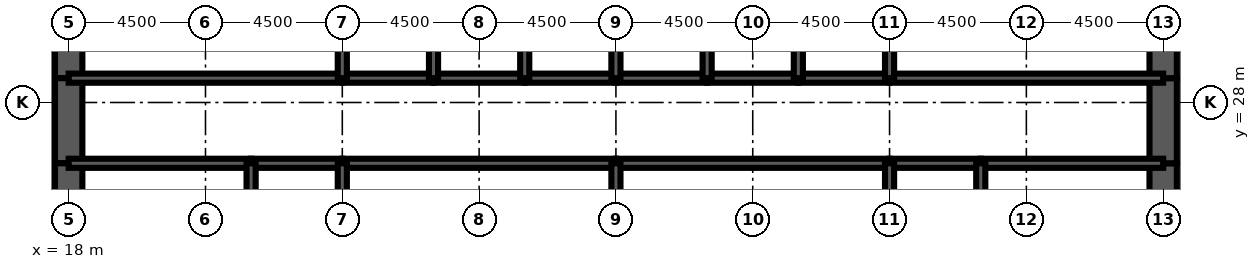
"""IFC4 building model, lengths in metres.
Left out: names, types, materials, properties, quantities, classifications, styles, units other than length and angle.
Written with IfcOpenShell. Run it as: python <this file> out.ifc"""

import sys

from ifc_helpers import new_model, si_unit, direction, frame, frame_2d, origin, place, context, subcontext, project, spatial, rectangle, extrude, element, fill, save


model = new_model("IFC4")
c1 = context("Model", 3, precision=1e-05, world=origin(), true_north=direction((0.0, 1.0)))
c2 = subcontext(c1, "Body", "Model", "MODEL_VIEW")
j1 = project(units=[si_unit("LENGTHUNIT", "METRE"), si_unit("PLANEANGLEUNIT", "RADIAN")], contexts=[c1])
p1 = place(None, origin())
s1 = spatial("IfcSite", under=j1, at=p1, CompositionType="ELEMENT")
p2 = place(p1, origin())
s2 = spatial("IfcBuilding", under=s1, at=p2, CompositionType="ELEMENT")
p3 = place(p2, frame((0.0, 0.0, -6.0)))
s3 = spatial("IfcBuildingStorey", under=s2, at=p3, CompositionType="ELEMENT", Elevation=-6.0)
p4 = place(p3, frame((18.0, 32.0, 0.0), z_axis=(0.0, 0.0, 1.0), x_axis=(0.0, -1.0, 0.0)))
e1 = element("IfcWall", 1, at=p4, inside=s3, PredefinedType="SHEAR", context=c2, shape_type="SweptSolid", body=[
    extrude(rectangle(XDim=3.2, YDim=0.9, at=frame_2d((1.6, 0.0))), origin(), (0.0, 0.0, 1.0), 6.0),
])
p5 = place(p3, frame((18.0, 28.8, 0.0), z_axis=(0.0, 0.0, 1.0), x_axis=(0.0, -1.0, 0.0)))
e2 = element("IfcWall", 2, at=p5, inside=s3, PredefinedType="SHEAR", context=c2, shape_type="SweptSolid", body=[
    extrude(rectangle(XDim=2.8, YDim=0.9, at=frame_2d((1.4, 0.0))), origin(), (0.0, 0.0, 1.0), 6.0),
])
p6 = place(p5, frame((0.4, 0.0, 0.0)))
e3 = element("IfcOpeningElement", 3, at=p6, cuts=e2, PredefinedType="OPENING", context=c2, shape_type="SweptSolid", body=[
    extrude(rectangle(XDim=1.8, YDim=2.1, at=frame_2d((0.9, 1.05))), frame((0.0, 0.46, 0.0), z_axis=(0.0, -1.0, 0.0), x_axis=(1.0, 0.0, 0.0)), (0.0, 0.0, 1.0), 0.92),
])
for number, where, z_axis, x_axis in (
    (4, (18.0, 26.0, 0.0), (0.0, 0.0, 1.0), (0.0, -1.0, 0.0)),
    (5, (54.0, 22.0, 0.0), (0.0, 0.0, 1.0), (0.0, 1.0, 0.0)),
):
    element("IfcWall", number, at=place(p3, frame(where, z_axis=z_axis, x_axis=x_axis)), inside=s3, PredefinedType="SHEAR", context=c2, shape_type="SweptSolid", body=[
        extrude(rectangle(XDim=4.0, YDim=0.9, at=frame_2d((2.0, 0.0))), origin(), (0.0, 0.0, 1.0), 6.0),
    ])
p7 = place(p3, frame((54.0, 26.0, 0.0), z_axis=(0.0, 0.0, 1.0), x_axis=(0.0, 1.0, 0.0)))
e6 = element("IfcWall", 6, at=p7, inside=s3, PredefinedType="SHEAR", context=c2, shape_type="SweptSolid", body=[
    extrude(rectangle(XDim=2.8, YDim=0.9, at=frame_2d((1.4, 0.0))), origin(), (0.0, 0.0, 1.0), 6.0),
])
p8 = place(p7, frame((0.6, 0.0, 0.0)))
e7 = element("IfcOpeningElement", 7, at=p8, cuts=e6, PredefinedType="OPENING", context=c2, shape_type="SweptSolid", body=[
    extrude(rectangle(XDim=1.8, YDim=2.1, at=frame_2d((0.9, 1.05))), frame((0.0, 0.46, 0.0), z_axis=(0.0, -1.0, 0.0), x_axis=(1.0, 0.0, 0.0)), (0.0, 0.0, 1.0), 0.92),
])
p9 = place(p3, frame((54.0, 28.8, 0.0), z_axis=(0.0, 0.0, 1.0), x_axis=(0.0, 1.0, 0.0)))
e8 = element("IfcWall", 8, at=p9, inside=s3, PredefinedType="SHEAR", context=c2, shape_type="SweptSolid", body=[
    extrude(rectangle(XDim=3.2, YDim=0.9, at=frame_2d((1.6, 0.0))), origin(), (0.0, 0.0, 1.0), 6.0),
])
p10 = place(p3, frame((18.0, 28.8, 0.0), z_axis=(0.0, 0.0, 1.0), x_axis=(1.0, 0.0, 0.0)))
e9 = element("IfcWall", 9, at=p10, inside=s3, PredefinedType="SOLIDWALL", context=c2, shape_type="SweptSolid", body=[
    extrude(rectangle(XDim=9.0, YDim=0.3, at=frame_2d((4.5, 0.0))), origin(), (0.0, 0.0, 1.0), 6.0),
])
p11 = place(p10, frame((0.65, 0.0, 0.0)))
e10 = element("IfcOpeningElement", 10, at=p11, cuts=e9, PredefinedType="OPENING", context=c2, shape_type="SweptSolid", body=[
    extrude(rectangle(XDim=1.0, YDim=2.1, at=frame_2d((0.5, 1.05))), frame((0.0, 0.16, 0.0), z_axis=(0.0, -1.0, 0.0), x_axis=(1.0, 0.0, 0.0)), (0.0, 0.0, 1.0), 0.32),
])
p12 = place(p3, frame((27.0, 28.8, 0.0), z_axis=(0.0, 0.0, 1.0), x_axis=(1.0, 0.0, 0.0)))
e11 = element("IfcWall", 11, at=p12, inside=s3, PredefinedType="SOLIDWALL", context=c2, shape_type="SweptSolid", body=[
    extrude(rectangle(XDim=3.0, YDim=0.3, at=frame_2d((1.5, 0.0))), origin(), (0.0, 0.0, 1.0), 6.0),
])
p13 = place(p12, frame((0.95, 0.0, 0.0)))
e12 = element("IfcOpeningElement", 12, at=p13, cuts=e11, PredefinedType="OPENING", context=c2, shape_type="SweptSolid", body=[
    extrude(rectangle(XDim=1.1, YDim=2.2, at=frame_2d((0.55, 1.1))), frame((0.0, 0.16, 0.0), z_axis=(0.0, -1.0, 0.0), x_axis=(1.0, 0.0, 0.0)), (0.0, 0.0, 1.0), 0.32),
])
for number, where, z_axis, x_axis in (
    (13, (30.0, 28.8, 0.0), (0.0, 0.0, 1.0), (1.0, 0.0, 0.0)),
    (14, (33.0, 28.8, 0.0), (0.0, 0.0, 1.0), (1.0, 0.0, 0.0)),
    (15, (36.0, 28.8, 0.0), (0.0, 0.0, 1.0), (1.0, 0.0, 0.0)),
    (16, (39.0, 28.8, 0.0), (0.0, 0.0, 1.0), (1.0, 0.0, 0.0)),
):
    element("IfcWall", number, at=place(p3, frame(where, z_axis=z_axis, x_axis=x_axis)), inside=s3, PredefinedType="SOLIDWALL", context=c2, shape_type="SweptSolid", body=[
        extrude(rectangle(XDim=3.0, YDim=0.3, at=frame_2d((1.5, 0.0))), origin(), (0.0, 0.0, 1.0), 6.0),
    ])
p14 = place(p3, frame((42.0, 28.8, 0.0), z_axis=(0.0, 0.0, 1.0), x_axis=(1.0, 0.0, 0.0)))
e17 = element("IfcWall", 17, at=p14, inside=s3, PredefinedType="SOLIDWALL", context=c2, shape_type="SweptSolid", body=[
    extrude(rectangle(XDim=3.0, YDim=0.3, at=frame_2d((1.5, 0.0))), origin(), (0.0, 0.0, 1.0), 6.0),
])
p15 = place(p14, frame((0.95, 0.0, 0.0)))
e18 = element("IfcOpeningElement", 18, at=p15, cuts=e17, PredefinedType="OPENING", context=c2, shape_type="SweptSolid", body=[
    extrude(rectangle(XDim=1.1, YDim=2.2, at=frame_2d((0.55, 1.1))), frame((0.0, 0.16, 0.0), z_axis=(0.0, -1.0, 0.0), x_axis=(1.0, 0.0, 0.0)), (0.0, 0.0, 1.0), 0.32),
])
p16 = place(p3, frame((45.0, 28.8, 0.0), z_axis=(0.0, 0.0, 1.0), x_axis=(1.0, 0.0, 0.0)))
e19 = element("IfcWall", 19, at=p16, inside=s3, PredefinedType="SOLIDWALL", context=c2, shape_type="SweptSolid", body=[
    extrude(rectangle(XDim=9.0, YDim=0.3, at=frame_2d((4.5, 0.0))), origin(), (0.0, 0.0, 1.0), 6.0),
])
p17 = place(p16, frame((7.35, 0.0, 0.0)))
e20 = element("IfcOpeningElement", 20, at=p17, cuts=e19, PredefinedType="OPENING", context=c2, shape_type="SweptSolid", body=[
    extrude(rectangle(XDim=1.0, YDim=2.1, at=frame_2d((0.5, 1.05))), frame((0.0, 0.16, 0.0), z_axis=(0.0, -1.0, 0.0), x_axis=(1.0, 0.0, 0.0)), (0.0, 0.0, 1.0), 0.32),
])
p18 = place(p3, frame((18.0, 26.0, 0.0), z_axis=(0.0, 0.0, 1.0), x_axis=(1.0, 0.0, 0.0)))
e21 = element("IfcWall", 21, at=p18, inside=s3, PredefinedType="SOLIDWALL", context=c2, shape_type="SweptSolid", body=[
    extrude(rectangle(XDim=6.0, YDim=0.3, at=frame_2d((3.0, 0.0))), origin(), (0.0, 0.0, 1.0), 6.0),
])
p19 = place(p3, frame((24.0, 26.0, 0.0), z_axis=(0.0, 0.0, 1.0), x_axis=(1.0, 0.0, 0.0)))
e22 = element("IfcWall", 22, at=p19, inside=s3, PredefinedType="SOLIDWALL", context=c2, shape_type="SweptSolid", body=[
    extrude(rectangle(XDim=3.0, YDim=0.3, at=frame_2d((1.5, 0.0))), origin(), (0.0, 0.0, 1.0), 6.0),
])
for number, where, z_axis, x_axis in (
    (23, (27.0, 26.0, 0.0), (0.0, 0.0, 1.0), (1.0, 0.0, 0.0)),
    (24, (36.0, 26.0, 0.0), (0.0, 0.0, 1.0), (1.0, 0.0, 0.0)),
):
    element("IfcWall", number, at=place(p3, frame(where, z_axis=z_axis, x_axis=x_axis)), inside=s3, PredefinedType="SOLIDWALL", context=c2, shape_type="SweptSolid", body=[
        extrude(rectangle(XDim=9.0, YDim=0.3, at=frame_2d((4.5, 0.0))), origin(), (0.0, 0.0, 1.0), 6.0),
    ])
p20 = place(p3, frame((45.0, 26.0, 0.0), z_axis=(0.0, 0.0, 1.0), x_axis=(1.0, 0.0, 0.0)))
e25 = element("IfcWall", 25, at=p20, inside=s3, PredefinedType="SOLIDWALL", context=c2, shape_type="SweptSolid", body=[
    extrude(rectangle(XDim=3.0, YDim=0.3, at=frame_2d((1.5, 0.0))), origin(), (0.0, 0.0, 1.0), 6.0),
])
p21 = place(p3, frame((48.0, 26.0, 0.0), z_axis=(0.0, 0.0, 1.0), x_axis=(1.0, 0.0, 0.0)))
e26 = element("IfcWall", 26, at=p21, inside=s3, PredefinedType="SOLIDWALL", context=c2, shape_type="SweptSolid", body=[
    extrude(rectangle(XDim=6.0, YDim=0.3, at=frame_2d((3.0, 0.0))), origin(), (0.0, 0.0, 1.0), 6.0),
])
for number, where, z_axis, x_axis in (
    (27, (27.0, 28.8, 0.0), (0.0, 0.0, 1.0), (0.0, 1.0, 0.0)),
    (28, (30.0, 28.8, 0.0), (0.0, 0.0, 1.0), (0.0, 1.0, 0.0)),
    (29, (33.0, 28.8, 0.0), (0.0, 0.0, 1.0), (0.0, 1.0, 0.0)),
    (30, (36.0, 28.8, 0.0), (0.0, 0.0, 1.0), (0.0, 1.0, 0.0)),
    (31, (39.0, 28.8, 0.0), (0.0, 0.0, 1.0), (0.0, 1.0, 0.0)),
    (32, (42.0, 28.8, 0.0), (0.0, 0.0, 1.0), (0.0, 1.0, 0.0)),
    (33, (45.0, 28.8, 0.0), (0.0, 0.0, 1.0), (0.0, 1.0, 0.0)),
):
    element("IfcWall", number, at=place(p3, frame(where, z_axis=z_axis, x_axis=x_axis)), inside=s3, PredefinedType="SOLIDWALL", context=c2, shape_type="SweptSolid", body=[
        extrude(rectangle(XDim=3.2, YDim=0.3, at=frame_2d((1.6, 0.0))), origin(), (0.0, 0.0, 1.0), 6.0),
    ])
for number, where, z_axis, x_axis in (
    (34, (24.0, 22.0, 0.0), (0.0, 0.0, 1.0), (0.0, 1.0, 0.0)),
    (35, (27.0, 22.0, 0.0), (0.0, 0.0, 1.0), (0.0, 1.0, 0.0)),
    (36, (36.0, 22.0, 0.0), (0.0, 0.0, 1.0), (0.0, 1.0, 0.0)),
    (37, (45.0, 22.0, 0.0), (0.0, 0.0, 1.0), (0.0, 1.0, 0.0)),
    (38, (48.0, 22.0, 0.0), (0.0, 0.0, 1.0), (0.0, 1.0, 0.0)),
):
    element("IfcWall", number, at=place(p3, frame(where, z_axis=z_axis, x_axis=x_axis)), inside=s3, PredefinedType="SOLIDWALL", context=c2, shape_type="SweptSolid", body=[
        extrude(rectangle(XDim=4.0, YDim=0.3, at=frame_2d((2.0, 0.0))), origin(), (0.0, 0.0, 1.0), 6.0),
    ])
p22 = place(p3, frame((51.975, 22.15, 0.0), z_axis=(0.0, 0.0, 1.0), x_axis=(0.0, 1.0, 0.0)))
e39 = element("IfcWall", 39, at=p22, inside=s3, PredefinedType="PARTITIONING", context=c2, shape_type="SweptSolid", body=[
    extrude(rectangle(XDim=3.7, YDim=0.15, at=frame_2d((1.85, 0.0))), origin(), (0.0, 0.0, 1.0), 3.0),
])
p23 = place(p15, origin())
e40 = element("IfcDoor", 40, at=p23, inside=s3, OperationType="DOUBLE_DOOR_SLIDING", PredefinedType="USERDEFINED", context=c2, shape_type="SweptSolid", body=[
    extrude(rectangle(XDim=1.1, YDim=2.2, at=frame_2d((0.55, 1.1))), frame((0.0, 0.025, 0.0), z_axis=(0.0, -1.0, 0.0), x_axis=(1.0, 0.0, 0.0)), (0.0, 0.0, 1.0), 0.05),
])
fill(e18, e40)
p24 = place(p13, origin())
e41 = element("IfcDoor", 41, at=p24, inside=s3, OperationType="DOUBLE_DOOR_SLIDING", PredefinedType="USERDEFINED", context=c2, shape_type="SweptSolid", body=[
    extrude(rectangle(XDim=1.1, YDim=2.2, at=frame_2d((0.55, 1.1))), frame((0.0, 0.025, 0.0), z_axis=(0.0, -1.0, 0.0), x_axis=(1.0, 0.0, 0.0)), (0.0, 0.0, 1.0), 0.05),
])
fill(e12, e41)
p25 = place(p11, origin())
e42 = element("IfcDoor", 42, at=p25, inside=s3, OperationType="SINGLE_SWING_LEFT", PredefinedType="DOOR", context=c2, shape_type="SweptSolid", body=[
    extrude(rectangle(XDim=1.0, YDim=2.1, at=frame_2d((0.5, 1.05))), frame((0.0, 0.025, 0.0), z_axis=(0.0, -1.0, 0.0), x_axis=(1.0, 0.0, 0.0)), (0.0, 0.0, 1.0), 0.05),
])
fill(e10, e42)
p26 = place(p17, origin())
e43 = element("IfcDoor", 43, at=p26, inside=s3, OperationType="SINGLE_SWING_RIGHT", PredefinedType="DOOR", context=c2, shape_type="SweptSolid", body=[
    extrude(rectangle(XDim=1.0, YDim=2.1, at=frame_2d((0.5, 1.05))), frame((0.0, 0.025, 0.0), z_axis=(0.0, -1.0, 0.0), x_axis=(1.0, 0.0, 0.0)), (0.0, 0.0, 1.0), 0.05),
])
fill(e20, e43)
p27 = place(p6, origin())
e44 = element("IfcDoor", 44, at=p27, inside=s3, OperationType="SINGLE_SWING_LEFT", PredefinedType="DOOR", context=c2, shape_type="SweptSolid", body=[
    extrude(rectangle(XDim=1.8, YDim=2.1, at=frame_2d((0.9, 1.05))), frame((0.0, 0.45, 0.0), z_axis=(0.0, -1.0, 0.0), x_axis=(1.0, 0.0, 0.0)), (0.0, 0.0, 1.0), 0.899),
])
fill(e3, e44)
p28 = place(p8, origin())
e45 = element("IfcDoor", 45, at=p28, inside=s3, OperationType="SINGLE_SWING_LEFT", PredefinedType="DOOR", context=c2, shape_type="SweptSolid", body=[
    extrude(rectangle(XDim=1.8, YDim=2.1, at=frame_2d((0.9, 1.05))), frame((0.0, 0.45, 0.0), z_axis=(0.0, -1.0, 0.0), x_axis=(1.0, 0.0, 0.0)), (0.0, 0.0, 1.0), 0.899),
])
fill(e7, e45)
save(model, sys.argv[1])
